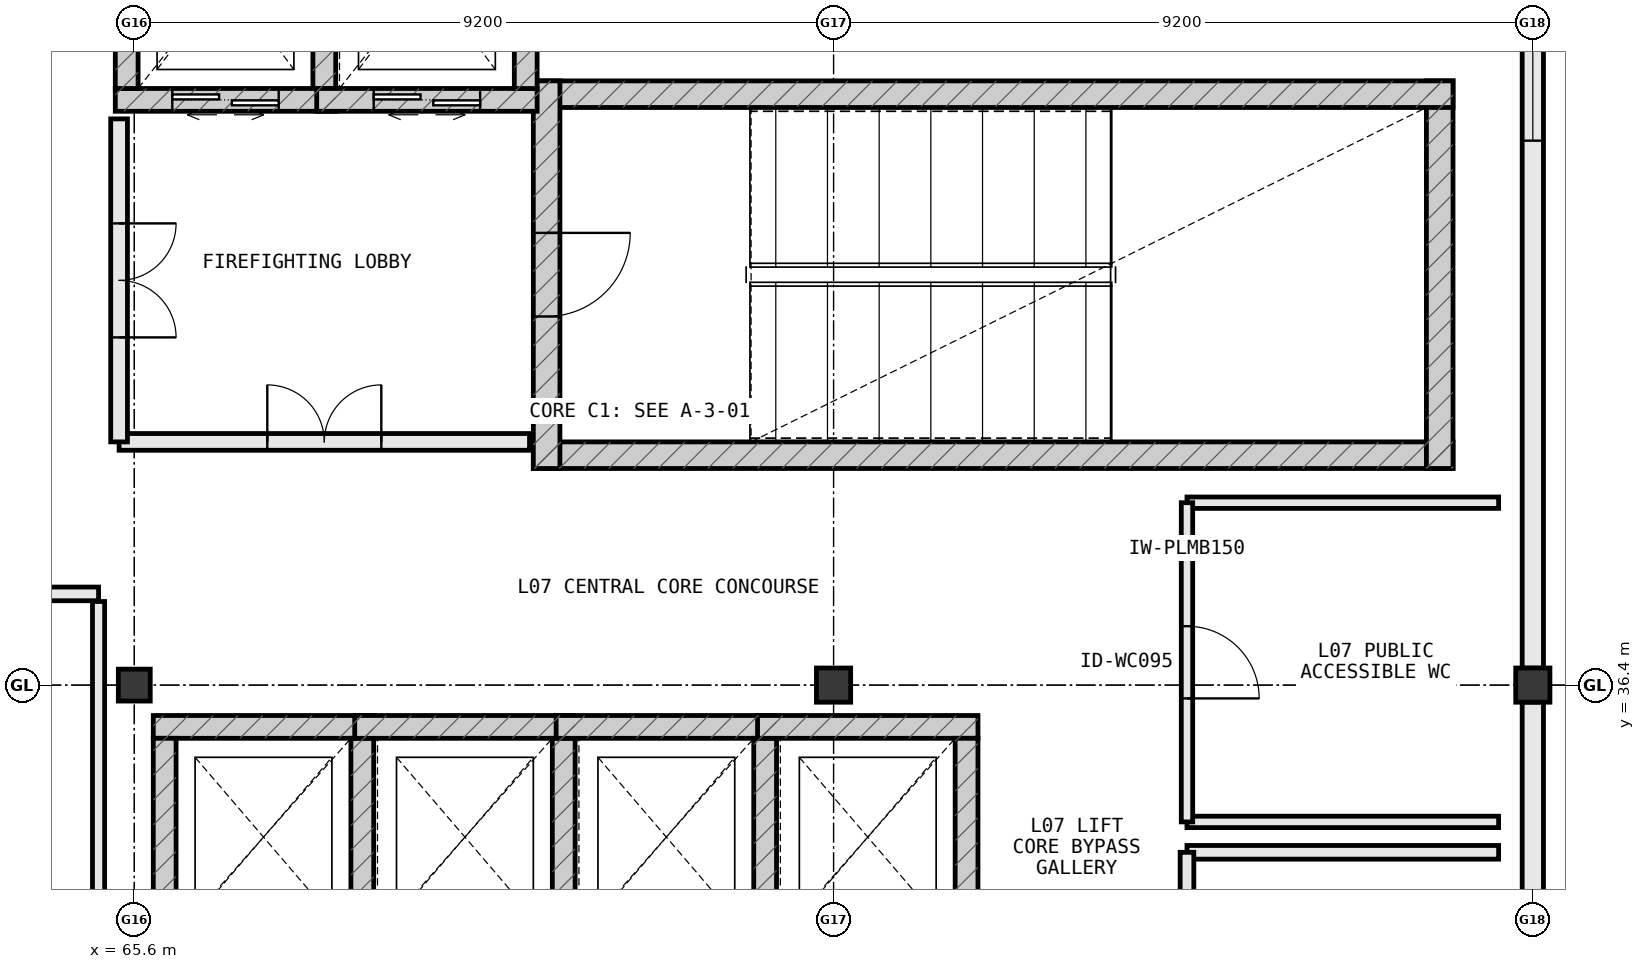
"""IFC4 building model, lengths in metres.
Left out: names, types, materials, properties, quantities, classifications, styles, units other than length and angle.
Written with IfcOpenShell. Run it as: python <this file> out.ifc"""

import sys

from ifc_helpers import new_model, si_unit, direction, frame, frame_2d, origin, origin_2d, place, context, subcontext, project, spatial, rectangle, extrude, element, fill, save


model = new_model("IFC4")
c1 = context("Model", 3, precision=1e-05, world=origin(), true_north=direction((0.0, 1.0)))
c2 = subcontext(c1, "Body", "Model", "MODEL_VIEW")
j1 = project(units=[si_unit("LENGTHUNIT", "METRE"), si_unit("PLANEANGLEUNIT", "RADIAN")], contexts=[c1])
p1 = place(None, origin())
s1 = spatial("IfcSite", under=j1, at=p1, CompositionType="ELEMENT")
p2 = place(p1, origin())
s2 = spatial("IfcBuilding", under=s1, at=p2, CompositionType="ELEMENT")
p3 = place(p2, frame((0.0, 0.0, 31.4)))
s3 = spatial("IfcBuildingStorey", under=s2, at=p3, CompositionType="ELEMENT", Elevation=31.4)
for number, where, z_axis, x_axis in (
    (1, (74.8, 36.4, 0.0), (0.0, 0.0, 1.0), (1.0, 0.0, 0.0)),
    (2, (84.0, 36.4, 0.0), (0.0, 0.0, 1.0), (1.0, 0.0, 0.0)),
):
    element("IfcColumn", number, at=place(p3, frame(where, z_axis=z_axis, x_axis=x_axis)), inside=s3, PredefinedType="COLUMN", context=c2, shape_type="SweptSolid", body=[
        extrude(rectangle(XDim=0.45, YDim=0.45, at=origin_2d()), origin(), (0.0, 0.0, 1.0), 3.8),
    ])
p4 = place(p3, frame((65.6, 36.4, 0.0), z_axis=(0.0, 0.0, 1.0), x_axis=(1.0, 0.0, 0.0)))
e3 = element("IfcColumn", 3, at=p4, inside=s3, PredefinedType="COLUMN", context=c2, shape_type="SweptSolid", body=[
    extrude(rectangle(XDim=0.42, YDim=0.42, at=origin_2d()), origin(), (0.0, 0.0, 1.0), 3.8),
])
p5 = place(p3, frame((84.0, 27.223, 0.0), z_axis=(0.0, 0.0, 1.0), x_axis=(0.0, 1.0, 0.0)))
e4 = element("IfcWall", 4, at=p5, inside=s3, PredefinedType="STANDARD", context=c2, shape_type="SweptSolid", body=[
    extrude(rectangle(XDim=8.954, YDim=0.28, at=frame_2d((4.477, 0.0))), origin(), (0.0, 0.0, 1.0), 2.97),
])
p6 = place(p5, frame((3.652, 0.0, 0.85)))
e5 = element("IfcOpeningElement", 5, at=p6, cuts=e4, PredefinedType="OPENING", context=c2, shape_type="SweptSolid", body=[
    extrude(rectangle(XDim=1.65, YDim=1.8, at=frame_2d((0.825, 0.9))), frame((0.0, 0.152, 0.0), z_axis=(0.0, -1.0, 0.0), x_axis=(1.0, 0.0, 0.0)), (0.0, 0.0, 1.0), 0.304),
])
p7 = place(p3, frame((84.0, 36.623, 0.0), z_axis=(0.0, 0.0, 1.0), x_axis=(0.0, 1.0, 0.0)))
e6 = element("IfcWall", 6, at=p7, inside=s3, PredefinedType="STANDARD", context=c2, shape_type="SweptSolid", body=[
    extrude(rectangle(XDim=10.354, YDim=0.28, at=frame_2d((5.177, 0.0))), origin(), (0.0, 0.0, 1.0), 2.97),
])
p8 = place(p7, frame((6.94, 0.0, 0.85)))
e7 = element("IfcOpeningElement", 7, at=p8, cuts=e6, PredefinedType="OPENING", context=c2, shape_type="SweptSolid", body=[
    extrude(rectangle(XDim=1.65, YDim=1.8, at=frame_2d((0.825, 0.9))), frame((0.0, 0.152, 0.0), z_axis=(0.0, -1.0, 0.0), x_axis=(1.0, 0.0, 0.0)), (0.0, 0.0, 1.0), 0.304),
])
p9 = place(p3, frame((70.85, 39.425, 0.0), z_axis=(0.0, 0.0, 1.0), x_axis=(1.0, 0.0, 0.0)))
e8 = element("IfcWall", 8, at=p9, inside=s3, PredefinedType="SHEAR", context=c2, shape_type="SweptSolid", body=[
    extrude(rectangle(XDim=12.1, YDim=0.35, at=frame_2d((6.05, 0.0))), origin(), (0.0, 0.0, 1.0), 3.8),
])
p10 = place(p3, frame((82.775, 39.25, 0.0), z_axis=(0.0, 0.0, 1.0), x_axis=(0.0, 1.0, 0.0)))
e9 = element("IfcWall", 9, at=p10, inside=s3, PredefinedType="SHEAR", context=c2, shape_type="SweptSolid", body=[
    extrude(rectangle(XDim=5.1, YDim=0.35, at=frame_2d((2.55, 0.0))), origin(), (0.0, 0.0, 1.0), 3.8),
])
p11 = place(p3, frame((82.95, 44.175, 0.0), z_axis=(0.0, 0.0, 1.0), x_axis=(-1.0, 0.0, 0.0)))
e10 = element("IfcWall", 10, at=p11, inside=s3, PredefinedType="SHEAR", context=c2, shape_type="SweptSolid", body=[
    extrude(rectangle(XDim=12.1, YDim=0.35, at=frame_2d((6.05, 0.0))), origin(), (0.0, 0.0, 1.0), 3.8),
])
p12 = place(p3, frame((71.025, 44.35, 0.0), z_axis=(0.0, 0.0, 1.0), x_axis=(0.0, -1.0, 0.0)))
e11 = element("IfcWall", 11, at=p12, inside=s3, PredefinedType="SHEAR", context=c2, shape_type="SweptSolid", body=[
    extrude(rectangle(XDim=5.1, YDim=0.35, at=frame_2d((2.55, 0.0))), origin(), (0.0, 0.0, 1.0), 3.8),
])
p13 = place(p12, frame((2.0, 0.0, 0.0)))
e12 = element("IfcOpeningElement", 12, at=p13, cuts=e11, PredefinedType="OPENING", context=c2, shape_type="SweptSolid", body=[
    extrude(rectangle(XDim=1.1, YDim=2.2, at=frame_2d((0.55, 1.1))), frame((0.0, 0.187, 0.0), z_axis=(0.0, -1.0, 0.0), x_axis=(1.0, 0.0, 0.0)), (0.0, 0.0, 1.0), 0.374),
])
p14 = place(p3, frame((65.35, 44.1, 0.0), z_axis=(0.0, 0.0, 1.0), x_axis=(1.0, 0.0, 0.0)))
e13 = element("IfcWall", 13, at=p14, inside=s3, PredefinedType="SHEAR", context=c2, shape_type="SweptSolid", body=[
    extrude(rectangle(XDim=2.9, YDim=0.3, at=frame_2d((1.45, 0.0))), origin(), (0.0, 0.0, 1.0), 3.8),
])
p15 = place(p14, frame((0.75, 0.0, 0.0)))
e14 = element("IfcOpeningElement", 14, at=p15, cuts=e13, PredefinedType="OPENING", context=c2, shape_type="SweptSolid", body=[
    extrude(rectangle(XDim=1.4, YDim=2.2, at=frame_2d((0.7, 1.1))), frame((0.0, 0.162, 0.0), z_axis=(0.0, -1.0, 0.0), x_axis=(1.0, 0.0, 0.0)), (0.0, 0.0, 1.0), 0.324),
])
for number, where, z_axis, x_axis in (
    (15, (68.1, 44.25, 0.0), (0.0, 0.0, 1.0), (0.0, 1.0, 0.0)),
    (16, (65.5, 47.15, 0.0), (0.0, 0.0, 1.0), (0.0, -1.0, 0.0)),
):
    element("IfcWall", number, at=place(p3, frame(where, z_axis=z_axis, x_axis=x_axis)), inside=s3, PredefinedType="SHEAR", context=c2, shape_type="SweptSolid", body=[
        extrude(rectangle(XDim=2.9, YDim=0.3, at=frame_2d((1.45, 0.0))), origin(), (0.0, 0.0, 1.0), 3.8),
    ])
p16 = place(p3, frame((68.0, 44.1, 0.0), z_axis=(0.0, 0.0, 1.0), x_axis=(1.0, 0.0, 0.0)))
e17 = element("IfcWall", 17, at=p16, inside=s3, PredefinedType="SHEAR", context=c2, shape_type="SweptSolid", body=[
    extrude(rectangle(XDim=2.9, YDim=0.3, at=frame_2d((1.45, 0.0))), origin(), (0.0, 0.0, 1.0), 3.8),
])
p17 = place(p16, frame((0.75, 0.0, 0.0)))
e18 = element("IfcOpeningElement", 18, at=p17, cuts=e17, PredefinedType="OPENING", context=c2, shape_type="SweptSolid", body=[
    extrude(rectangle(XDim=1.4, YDim=2.2, at=frame_2d((0.7, 1.1))), frame((0.0, 0.162, 0.0), z_axis=(0.0, -1.0, 0.0), x_axis=(1.0, 0.0, 0.0)), (0.0, 0.0, 1.0), 0.324),
])
for number, where, z_axis, x_axis in (
    (19, (70.75, 44.25, 0.0), (0.0, 0.0, 1.0), (0.0, 1.0, 0.0)),
    (20, (68.75, 35.85, 0.0), (0.0, 0.0, 1.0), (-1.0, 0.0, 0.0)),
):
    element("IfcWall", number, at=place(p3, frame(where, z_axis=z_axis, x_axis=x_axis)), inside=s3, PredefinedType="SHEAR", context=c2, shape_type="SweptSolid", body=[
        extrude(rectangle(XDim=2.9, YDim=0.3, at=frame_2d((1.45, 0.0))), origin(), (0.0, 0.0, 1.0), 3.8),
    ])
for number, where, z_axis, x_axis in (
    (21, (68.6, 33.1, 0.0), (0.0, 0.0, 1.0), (0.0, 1.0, 0.0)),
    (22, (66.0, 35.7, 0.0), (0.0, 0.0, 1.0), (0.0, -1.0, 0.0)),
):
    element("IfcWall", number, at=place(p3, frame(where, z_axis=z_axis, x_axis=x_axis)), inside=s3, PredefinedType="SHEAR", context=c2, shape_type="SweptSolid", body=[
        extrude(rectangle(XDim=2.6, YDim=0.3, at=frame_2d((1.3, 0.0))), origin(), (0.0, 0.0, 1.0), 3.8),
    ])
p18 = place(p3, frame((71.4, 35.85, 0.0), z_axis=(0.0, 0.0, 1.0), x_axis=(-1.0, 0.0, 0.0)))
e23 = element("IfcWall", 23, at=p18, inside=s3, PredefinedType="SHEAR", context=c2, shape_type="SweptSolid", body=[
    extrude(rectangle(XDim=2.9, YDim=0.3, at=frame_2d((1.45, 0.0))), origin(), (0.0, 0.0, 1.0), 3.8),
])
p19 = place(p3, frame((71.25, 33.1, 0.0), z_axis=(0.0, 0.0, 1.0), x_axis=(0.0, 1.0, 0.0)))
e24 = element("IfcWall", 24, at=p19, inside=s3, PredefinedType="SHEAR", context=c2, shape_type="SweptSolid", body=[
    extrude(rectangle(XDim=2.6, YDim=0.3, at=frame_2d((1.3, 0.0))), origin(), (0.0, 0.0, 1.0), 3.8),
])
p20 = place(p3, frame((74.05, 35.85, 0.0), z_axis=(0.0, 0.0, 1.0), x_axis=(-1.0, 0.0, 0.0)))
e25 = element("IfcWall", 25, at=p20, inside=s3, PredefinedType="SHEAR", context=c2, shape_type="SweptSolid", body=[
    extrude(rectangle(XDim=2.9, YDim=0.3, at=frame_2d((1.45, 0.0))), origin(), (0.0, 0.0, 1.0), 3.8),
])
p21 = place(p3, frame((73.9, 33.1, 0.0), z_axis=(0.0, 0.0, 1.0), x_axis=(0.0, 1.0, 0.0)))
e26 = element("IfcWall", 26, at=p21, inside=s3, PredefinedType="SHEAR", context=c2, shape_type="SweptSolid", body=[
    extrude(rectangle(XDim=2.6, YDim=0.3, at=frame_2d((1.3, 0.0))), origin(), (0.0, 0.0, 1.0), 3.8),
])
p22 = place(p3, frame((76.7, 35.85, 0.0), z_axis=(0.0, 0.0, 1.0), x_axis=(-1.0, 0.0, 0.0)))
e27 = element("IfcWall", 27, at=p22, inside=s3, PredefinedType="SHEAR", context=c2, shape_type="SweptSolid", body=[
    extrude(rectangle(XDim=2.9, YDim=0.3, at=frame_2d((1.45, 0.0))), origin(), (0.0, 0.0, 1.0), 3.8),
])
p23 = place(p3, frame((76.55, 33.1, 0.0), z_axis=(0.0, 0.0, 1.0), x_axis=(0.0, 1.0, 0.0)))
e28 = element("IfcWall", 28, at=p23, inside=s3, PredefinedType="SHEAR", context=c2, shape_type="SweptSolid", body=[
    extrude(rectangle(XDim=2.6, YDim=0.3, at=frame_2d((1.3, 0.0))), origin(), (0.0, 0.0, 1.0), 3.8),
])
p24 = place(p3, frame((65.4, 39.6, 0.0), z_axis=(0.0, 0.0, 1.0), x_axis=(1.0, 0.0, 0.0)))
e29 = element("IfcWall", 29, at=p24, inside=s3, PredefinedType="STANDARD", context=c2, shape_type="SweptSolid", body=[
    extrude(rectangle(XDim=5.4, YDim=0.22, at=frame_2d((2.7, 0.0))), origin(), (0.0, 0.0, 1.0), 3.555),
])
p25 = place(p24, frame((1.95, 0.0, 0.0)))
e30 = element("IfcOpeningElement", 30, at=p25, cuts=e29, PredefinedType="OPENING", context=c2, shape_type="SweptSolid", body=[
    extrude(rectangle(XDim=1.5, YDim=2.2, at=frame_2d((0.75, 1.1))), frame((0.0, 0.122, 0.0), z_axis=(0.0, -1.0, 0.0), x_axis=(1.0, 0.0, 0.0)), (0.0, 0.0, 1.0), 0.244),
])
p26 = place(p3, frame((65.4, 43.85, 0.0), z_axis=(0.0, 0.0, 1.0), x_axis=(0.0, -1.0, 0.0)))
e31 = element("IfcWall", 31, at=p26, inside=s3, PredefinedType="STANDARD", context=c2, shape_type="SweptSolid", body=[
    extrude(rectangle(XDim=4.25, YDim=0.22, at=frame_2d((2.125, 0.0))), origin(), (0.0, 0.0, 1.0), 3.555),
])
p27 = place(p26, frame((1.375, 0.0, 0.0)))
e32 = element("IfcOpeningElement", 32, at=p27, cuts=e31, PredefinedType="OPENING", context=c2, shape_type="SweptSolid", body=[
    extrude(rectangle(XDim=1.5, YDim=2.2, at=frame_2d((0.75, 1.1))), frame((0.0, 0.122, 0.0), z_axis=(0.0, -1.0, 0.0), x_axis=(1.0, 0.0, 0.0)), (0.0, 0.0, 1.0), 0.244),
])
p28 = place(p3, frame((83.55, 34.2, 0.0), z_axis=(0.0, 0.0, 1.0), x_axis=(-1.0, 0.0, 0.0)))
e33 = element("IfcWall", 33, at=p28, inside=s3, PredefinedType="PARTITIONING", context=c2, shape_type="SweptSolid", body=[
    extrude(rectangle(XDim=4.1, YDim=0.18, at=frame_2d((2.05, 0.0))), origin(), (0.0, 0.0, 1.0), 3.555),
])
p29 = place(p3, frame((79.45, 34.2, 0.0), z_axis=(0.0, 0.0, 1.0), x_axis=(0.0, -1.0, 0.0)))
e34 = element("IfcWall", 34, at=p29, inside=s3, PredefinedType="PARTITIONING", context=c2, shape_type="SweptSolid", body=[
    extrude(rectangle(XDim=4.4, YDim=0.18, at=frame_2d((2.2, 0.0))), origin(), (0.0, 0.0, 1.0), 3.555),
])
p30 = place(p29, frame((1.675, 0.0, 0.0)))
e35 = element("IfcOpeningElement", 35, at=p30, cuts=e34, PredefinedType="OPENING", context=c2, shape_type="SweptSolid", body=[
    extrude(rectangle(XDim=1.05, YDim=2.2, at=frame_2d((0.525, 1.1))), frame((0.0, 0.102, 0.0), z_axis=(0.0, -1.0, 0.0), x_axis=(1.0, 0.0, 0.0)), (0.0, 0.0, 1.0), 0.204),
])
for number, where, z_axis, x_axis in (
    (36, (79.45, 34.6, 0.0), (0.0, 0.0, 1.0), (1.0, 0.0, 0.0)),
    (37, (83.55, 38.8, 0.0), (0.0, 0.0, 1.0), (-1.0, 0.0, 0.0)),
):
    element("IfcWall", number, at=place(p3, frame(where, z_axis=z_axis, x_axis=x_axis)), inside=s3, PredefinedType="PLUMBINGWALL", context=c2, shape_type="SweptSolid", body=[
        extrude(rectangle(XDim=4.1, YDim=0.15, at=frame_2d((2.05, 0.0))), origin(), (0.0, 0.0, 1.0), 3.555),
    ])
p31 = place(p3, frame((79.45, 38.8, 0.0), z_axis=(0.0, 0.0, 1.0), x_axis=(0.0, -1.0, 0.0)))
e38 = element("IfcWall", 38, at=p31, inside=s3, PredefinedType="PLUMBINGWALL", context=c2, shape_type="SweptSolid", body=[
    extrude(rectangle(XDim=4.2, YDim=0.15, at=frame_2d((2.1, 0.0))), origin(), (0.0, 0.0, 1.0), 3.555),
])
p32 = place(p31, frame((1.625, 0.0, 0.0)))
e39 = element("IfcOpeningElement", 39, at=p32, cuts=e38, PredefinedType="OPENING", context=c2, shape_type="SweptSolid", body=[
    extrude(rectangle(XDim=0.95, YDim=2.15, at=frame_2d((0.475, 1.075))), frame((0.0, 0.087, 0.0), z_axis=(0.0, -1.0, 0.0), x_axis=(1.0, 0.0, 0.0)), (0.0, 0.0, 1.0), 0.174),
])
p33 = place(p3, frame((65.13, 37.6, 0.0), z_axis=(0.0, 0.0, 1.0), x_axis=(-1.0, 0.0, 0.0)))
e40 = element("IfcWall", 40, at=p33, inside=s3, PredefinedType="PARTITIONING", context=c2, shape_type="SweptSolid", body=[
    extrude(rectangle(XDim=5.78, YDim=0.18, at=frame_2d((2.89, 0.0))), origin(), (0.0, 0.0, 1.0), 3.555),
])
p34 = place(p33, frame((1.42, 0.0, 0.0)))
e41 = element("IfcOpeningElement", 41, at=p34, cuts=e40, PredefinedType="OPENING", context=c2, shape_type="SweptSolid", body=[
    extrude(rectangle(XDim=0.98, YDim=2.18, at=frame_2d((0.49, 1.09))), frame((0.0, 0.102, 0.0), z_axis=(0.0, -1.0, 0.0), x_axis=(1.0, 0.0, 0.0)), (0.0, 0.0, 1.0), 0.204),
])
p35 = place(p3, frame((65.13, 27.16, 0.0), z_axis=(0.0, 0.0, 1.0), x_axis=(0.0, 1.0, 0.0)))
e42 = element("IfcWall", 42, at=p35, inside=s3, PredefinedType="PARTITIONING", context=c2, shape_type="SweptSolid", body=[
    extrude(rectangle(XDim=10.34, YDim=0.16, at=frame_2d((5.17, 0.0))), origin(), (0.0, 0.0, 1.0), 3.555),
])
p36 = place(p8, origin())
e43 = element("IfcWindow", 43, at=p36, inside=s3, PartitioningType="SINGLE_PANEL", PredefinedType="WINDOW", context=c2, shape_type="SweptSolid", body=[
    extrude(rectangle(XDim=1.65, YDim=1.8, at=frame_2d((0.825, 0.9))), frame((0.0, 0.03, 0.0), z_axis=(0.0, -1.0, 0.0), x_axis=(1.0, 0.0, 0.0)), (0.0, 0.0, 1.0), 0.06),
])
fill(e7, e43)
p37 = place(p13, origin())
e44 = element("IfcDoor", 44, at=p37, inside=s3, OperationType="SINGLE_SWING_LEFT", PredefinedType="DOOR", context=c2, shape_type="SweptSolid", body=[
    extrude(rectangle(XDim=1.1, YDim=2.2, at=frame_2d((0.55, 1.1))), frame((0.0, 0.025, 0.0), z_axis=(0.0, -1.0, 0.0), x_axis=(1.0, 0.0, 0.0)), (0.0, 0.0, 1.0), 0.05),
])
fill(e12, e44)
p38 = place(p15, origin())
e45 = element("IfcDoor", 45, at=p38, inside=s3, OperationType="DOUBLE_DOOR_SLIDING", PredefinedType="DOOR", context=c2, shape_type="SweptSolid", body=[
    extrude(rectangle(XDim=1.4, YDim=2.2, at=frame_2d((0.7, 1.1))), frame((0.0, 0.025, 0.0), z_axis=(0.0, -1.0, 0.0), x_axis=(1.0, 0.0, 0.0)), (0.0, 0.0, 1.0), 0.05),
])
fill(e14, e45)
p39 = place(p17, origin())
e46 = element("IfcDoor", 46, at=p39, inside=s3, OperationType="DOUBLE_DOOR_SLIDING", PredefinedType="DOOR", context=c2, shape_type="SweptSolid", body=[
    extrude(rectangle(XDim=1.4, YDim=2.2, at=frame_2d((0.7, 1.1))), frame((0.0, 0.025, 0.0), z_axis=(0.0, -1.0, 0.0), x_axis=(1.0, 0.0, 0.0)), (0.0, 0.0, 1.0), 0.05),
])
fill(e18, e46)
p40 = place(p25, origin())
e47 = element("IfcDoor", 47, at=p40, inside=s3, OperationType="DOUBLE_DOOR_SINGLE_SWING", PredefinedType="DOOR", context=c2, shape_type="SweptSolid", body=[
    extrude(rectangle(XDim=1.5, YDim=2.2, at=frame_2d((0.75, 1.1))), frame((0.0, 0.025, 0.0), z_axis=(0.0, -1.0, 0.0), x_axis=(1.0, 0.0, 0.0)), (0.0, 0.0, 1.0), 0.05),
])
fill(e30, e47)
p41 = place(p27, origin())
e48 = element("IfcDoor", 48, at=p41, inside=s3, OperationType="DOUBLE_DOOR_SINGLE_SWING", PredefinedType="DOOR", context=c2, shape_type="SweptSolid", body=[
    extrude(rectangle(XDim=1.5, YDim=2.2, at=frame_2d((0.75, 1.1))), frame((0.0, 0.025, 0.0), z_axis=(0.0, -1.0, 0.0), x_axis=(1.0, 0.0, 0.0)), (0.0, 0.0, 1.0), 0.05),
])
fill(e32, e48)
p42 = place(p32, origin())
e49 = element("IfcDoor", 49, at=p42, inside=s3, OperationType="SINGLE_SWING_RIGHT", PredefinedType="DOOR", context=c2, shape_type="SweptSolid", body=[
    extrude(rectangle(XDim=0.95, YDim=2.15, at=frame_2d((0.475, 1.075))), frame((0.0, 0.025, 0.0), z_axis=(0.0, -1.0, 0.0), x_axis=(1.0, 0.0, 0.0)), (0.0, 0.0, 1.0), 0.05),
])
fill(e39, e49)
save(model, sys.argv[1])
